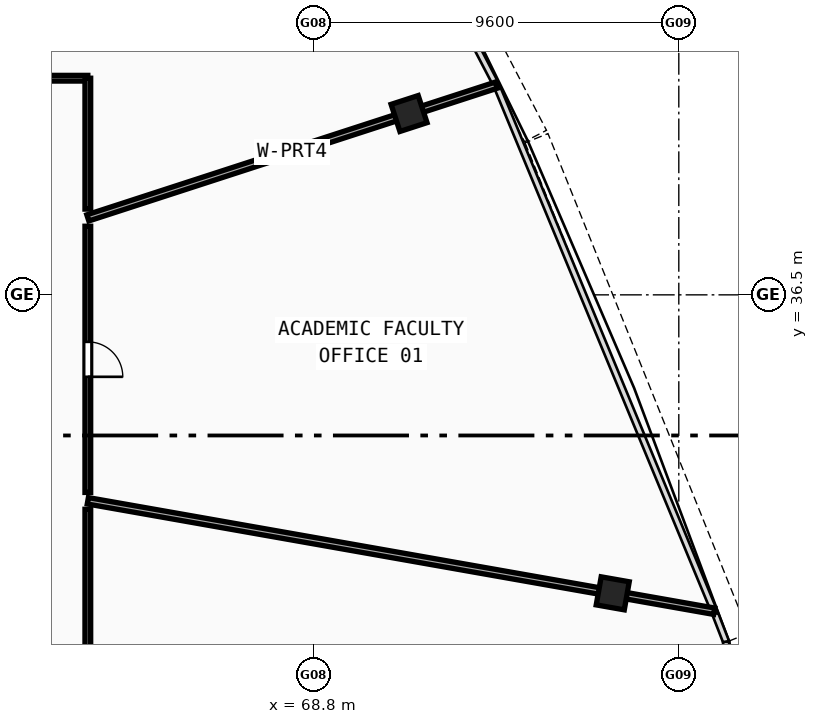
"""IFC4 building model, lengths in metres.
Left out: names, types, materials, properties, quantities, classifications, styles, units other than length and angle.
Written with IfcOpenShell. Run it as: python <this file> out.ifc"""

import sys

from ifc_helpers import new_model, si_unit, direction, frame, frame_2d, origin, origin_with_axes, origin_2d, place, context, subcontext, project, spatial, rectangle, hollow_rectangle, extrude, source, transform, mapped, element, fill, save


model = new_model("IFC4")
c1 = context("Model", 3, precision=1e-05, world=origin(), true_north=direction((0.0, 1.0)))
c2 = subcontext(c1, "Body", "Model", "MODEL_VIEW")
j1 = project(units=[si_unit("LENGTHUNIT", "METRE"), si_unit("PLANEANGLEUNIT", "RADIAN")], contexts=[c1])
p1 = place(None, origin())
s1 = spatial("IfcSite", under=j1, at=p1, CompositionType="ELEMENT")
p2 = place(p1, origin())
s2 = spatial("IfcBuilding", under=s1, at=p2, CompositionType="ELEMENT")
p3 = place(p2, frame((0.0, 0.0, 288.75)))
s3 = spatial("IfcBuildingStorey", under=s2, at=p3, CompositionType="ELEMENT", Elevation=288.75)
m1 = source(origin(), c2, "Body", "SweptSolid", [
    extrude(hollow_rectangle(XDim=0.75, YDim=0.75, WallThickness=0.028, at=origin_2d()), origin(), (0.0, 0.0, 1.0), 3.73),
])
for number, where, z_axis, x_axis in (
    (1, (76.662, 28.646, -0.26), (0.0, 0.0, 1.0), (0.174, 0.985, 0.0)),
    (2, (71.302, 41.271, -0.26), (0.0, 0.0, 1.0), (-0.309, 0.951, 0.0)),
):
    element("IfcColumn", number, at=place(p3, frame(where, z_axis=z_axis, x_axis=x_axis)), inside=s3, PredefinedType="COLUMN", context=c2, shape_type="MappedRepresentation", body=[
        mapped(m1, transform((0.0, 0.0, 0.0), scale=1.0)),
    ])
p4 = place(p3, frame((62.85, 38.525, 0.0), z_axis=(0.0, 0.0, 1.0), x_axis=(0.951060099206, 0.309005967092, 0.0)))
e3 = element("IfcWall", 3, at=p4, inside=s3, PredefinedType="PARTITIONING", context=c2, shape_type="SweptSolid", body=[
    extrude(rectangle(XDim=11.302, YDim=0.17, at=frame_2d((5.651, 0.0))), origin(), (0.0, 0.0, 1.0), 2.87),
])
p5 = place(p3, frame((57.44, 42.2, 0.0), z_axis=(0.0, 0.0, 1.0), x_axis=(0.743145593795, 0.669129753055, 0.0)))
e4 = element("IfcWall", 4, at=p5, inside=s3, PredefinedType="PARTITIONING", context=c2, shape_type="SweptSolid", body=[
    extrude(rectangle(XDim=14.711, YDim=0.17, at=frame_2d((7.355, 0.0))), origin(), (0.0, 0.0, 1.0), 2.87),
])
p6 = place(p3, frame((55.132, 42.2, 0.0), z_axis=(0.0, 0.0, 1.0), x_axis=(0.642779182264, 0.766051514487, 0.0)))
e5 = element("IfcWall", 5, at=p6, inside=s3, PredefinedType="PARTITIONING", context=c2, shape_type="SweptSolid", body=[
    extrude(rectangle(XDim=17.254, YDim=0.17, at=frame_2d((8.627, 0.0))), origin(), (0.0, 0.0, 1.0), 2.87),
])
p7 = place(p3, frame((62.85, 31.082, 0.0), z_axis=(0.0, 0.0, 1.0), x_axis=(0.984806900178, -0.173653014261, 0.0)))
e6 = element("IfcWall", 6, at=p7, inside=s3, PredefinedType="PARTITIONING", context=c2, shape_type="SweptSolid", body=[
    extrude(rectangle(XDim=16.736, YDim=0.17, at=frame_2d((8.368, 0.0))), origin(), (0.0, 0.0, 1.0), 2.87),
])
p8 = place(p3, frame((57.769, 42.2, 0.0), z_axis=(0.0, 0.0, 1.0), x_axis=(1.0, 0.0, 0.0)))
e7 = element("IfcWall", 7, at=p8, inside=s3, PredefinedType="PARTITIONING", context=c2, shape_type="SweptSolid", body=[
    extrude(rectangle(XDim=5.081, YDim=0.15, at=frame_2d((2.541, 0.0))), origin(), (0.0, 0.0, 1.0), 3.12),
])
p9 = place(p8, frame((2.146, 0.0, 0.0)))
e8 = element("IfcOpeningElement", 8, at=p9, cuts=e7, PredefinedType="OPENING", context=c2, shape_type="SweptSolid", body=[
    extrude(rectangle(XDim=0.92, YDim=2.1, at=frame_2d((0.46, 1.05))), frame((0.0, 0.085, 0.0), z_axis=(0.0, -1.0, 0.0), x_axis=(1.0, 0.0, 0.0)), (0.0, 0.0, 1.0), 0.17),
])
p10 = place(p3, frame((62.85, 42.2, 0.0), z_axis=(0.0, 0.0, 1.0), x_axis=(0.0, -1.0, 0.0)))
e9 = element("IfcWall", 9, at=p10, inside=s3, PredefinedType="PARTITIONING", context=c2, shape_type="SweptSolid", body=[
    extrude(rectangle(XDim=3.444, YDim=0.15, at=frame_2d((1.722, 0.0))), origin(), (0.0, 0.0, 1.0), 3.12),
])
p11 = place(p3, frame((62.85, 38.305, 0.0), z_axis=(0.0, 0.0, 1.0), x_axis=(0.0, -1.0, 0.0)))
e10 = element("IfcWall", 10, at=p11, inside=s3, PredefinedType="PARTITIONING", context=c2, shape_type="SweptSolid", body=[
    extrude(rectangle(XDim=7.004, YDim=0.15, at=frame_2d((3.502, 0.0))), origin(), (0.0, 0.0, 1.0), 3.47),
])
p12 = place(p11, frame((3.042, 0.0, 0.0)))
e11 = element("IfcOpeningElement", 11, at=p12, cuts=e10, PredefinedType="OPENING", context=c2, shape_type="SweptSolid", body=[
    extrude(rectangle(XDim=0.92, YDim=2.1, at=frame_2d((0.46, 1.05))), frame((0.0, 0.085, 0.0), z_axis=(0.0, -1.0, 0.0), x_axis=(1.0, 0.0, 0.0)), (0.0, 0.0, 1.0), 0.17),
])
p13 = place(p3, frame((62.85, 30.858, 0.0), z_axis=(0.0, 0.0, 1.0), x_axis=(0.0, -1.0, 0.0)))
e12 = element("IfcWall", 12, at=p13, inside=s3, PredefinedType="PARTITIONING", context=c2, shape_type="SweptSolid", body=[
    extrude(rectangle(XDim=5.958, YDim=0.15, at=frame_2d((2.979, 0.0))), origin(), (0.0, 0.0, 1.0), 3.12),
])
m2 = source(origin(), c2, "Body", "SweptSolid", [
    extrude(rectangle(XDim=0.92, YDim=2.1, at=frame_2d((0.46, 1.05))), frame((0.0, 0.025, 0.0), z_axis=(0.0, -1.0, 0.0), x_axis=(1.0, 0.0, 0.0)), (0.0, 0.0, 1.0), 0.05),
])
p14 = place(p12, origin_with_axes())
e13 = element("IfcDoor", 13, at=p14, inside=s3, OperationType="SINGLE_SWING_RIGHT", PredefinedType="DOOR", context=c2, shape_type="MappedRepresentation", body=[
    mapped(m2, transform((0.0, 0.0, 0.0), scale=1.0)),
])
fill(e11, e13)
save(model, sys.argv[1])
